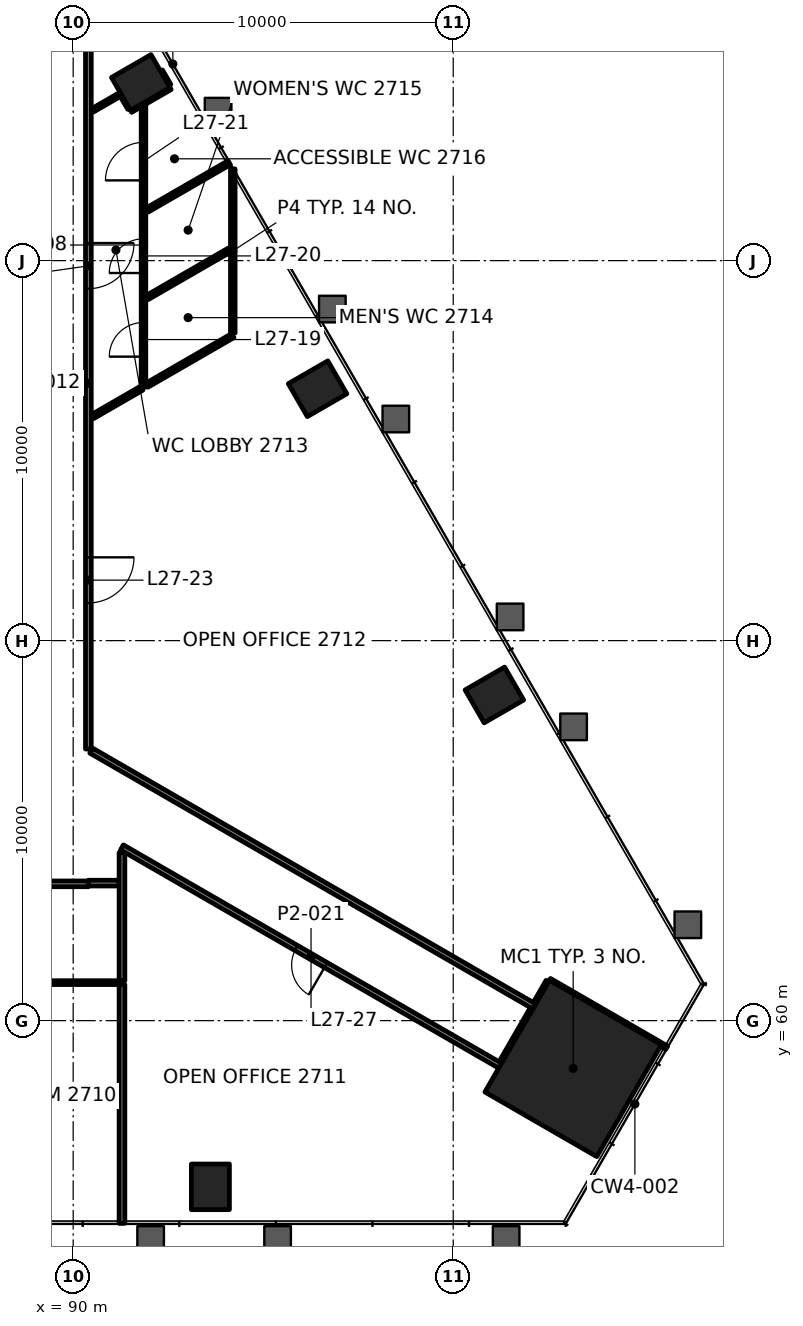
"""IFC4 building model, lengths in metres.
Left out: names, types, materials, properties, quantities, classifications, styles, units other than length and angle.
Written with IfcOpenShell. Run it as: python <this file> out.ifc"""

import sys

from ifc_helpers import new_model, si_unit, direction, frame, frame_2d, origin, origin_2d, place, context, subcontext, project, spatial, rectangle, extrude, element, fill, save


model = new_model("IFC4")
c1 = context("Model", 3, precision=1e-05, world=origin(), true_north=direction((0.0, 1.0)))
c2 = subcontext(c1, "Body", "Model", "MODEL_VIEW")
j1 = project(units=[si_unit("LENGTHUNIT", "METRE"), si_unit("PLANEANGLEUNIT", "RADIAN")], contexts=[c1])
p1 = place(None, origin())
s1 = spatial("IfcSite", under=j1, at=p1, CompositionType="ELEMENT")
p2 = place(p1, origin())
s2 = spatial("IfcBuilding", under=s1, at=p2, CompositionType="ELEMENT")
p3 = place(p2, frame((0.0, 0.0, 119.8)))
s3 = spatial("IfcBuildingStorey", under=s2, at=p3, CompositionType="ELEMENT", Elevation=119.8)
p4 = place(p3, frame((103.156, 58.744, 0.0), z_axis=(0.0, 0.0, 1.0), x_axis=(0.5, 0.866025403784, 0.0)))
e1 = element("IfcColumn", 1, at=p4, inside=s3, PredefinedType="COLUMN", context=c2, shape_type="SweptSolid", body=[
    extrude(rectangle(XDim=3.4, YDim=3.4, at=origin_2d()), origin(), (0.0, 0.0, 1.0), 4.2),
])
for number, where, z_axis, x_axis in (
    (2, (93.61, 55.626, -0.0), (0.0, 0.0, 1.0), (1.0, 0.0, 0.0)),
    (3, (101.083, 68.57, -0.0), (0.0, 0.0, 1.0), (-0.5, 0.866, 0.0)),
    (4, (96.431, 76.628, -0.0), (0.0, 0.0, 1.0), (-0.5, 0.866, 0.0)),
    (5, (91.778, 84.687, -0.0), (0.0, 0.0, 1.0), (-0.5, 0.866, 0.0)),
):
    element("IfcColumn", number, at=place(p3, frame(where, z_axis=z_axis, x_axis=x_axis)), inside=s3, PredefinedType="COLUMN", context=c2, shape_type="SweptSolid", body=[
        extrude(rectangle(XDim=1.0, YDim=1.2, at=origin_2d()), origin(), (0.0, 0.0, 1.0), 4.2),
    ])
p5 = place(p3, frame((57.751, 61.0, 0.0), z_axis=(0.0, 0.0, 1.0), x_axis=(1.0, 0.0, 0.0)))
e6 = element("IfcWall", 6, at=p5, inside=s3, PredefinedType="PARTITIONING", context=c2, shape_type="SweptSolid", body=[
    extrude(rectangle(XDim=33.533, YDim=0.1, at=frame_2d((16.766, 0.0))), origin(), (0.0, 0.0, 1.0), 3.4),
])
p6 = place(p5, frame((3.572, 0.0, 0.0)))
e7 = element("IfcOpeningElement", 7, at=p6, cuts=e6, PredefinedType="OPENING", context=c2, shape_type="SweptSolid", body=[
    extrude(rectangle(XDim=1.0, YDim=2.1, at=frame_2d((0.5, 1.05))), frame((0.0, 0.06, 0.0), z_axis=(0.0, -1.0, 0.0), x_axis=(1.0, 0.0, 0.0)), (0.0, 0.0, 1.0), 0.12),
])
p7 = place(p5, frame((9.822, 0.0, 0.0)))
e8 = element("IfcOpeningElement", 8, at=p7, cuts=e6, PredefinedType="OPENING", context=c2, shape_type="SweptSolid", body=[
    extrude(rectangle(XDim=0.9, YDim=2.1, at=frame_2d((0.45, 1.05))), frame((0.0, 0.06, 0.0), z_axis=(0.0, -1.0, 0.0), x_axis=(1.0, 0.0, 0.0)), (0.0, 0.0, 1.0), 0.12),
])
p8 = place(p5, frame((14.472, 0.0, 0.0)))
e9 = element("IfcOpeningElement", 9, at=p8, cuts=e6, PredefinedType="OPENING", context=c2, shape_type="SweptSolid", body=[
    extrude(rectangle(XDim=0.9, YDim=2.1, at=frame_2d((0.45, 1.05))), frame((0.0, 0.06, 0.0), z_axis=(0.0, -1.0, 0.0), x_axis=(1.0, 0.0, 0.0)), (0.0, 0.0, 1.0), 0.12),
])
p9 = place(p5, frame((19.124, 0.0, 0.0)))
e10 = element("IfcOpeningElement", 10, at=p9, cuts=e6, PredefinedType="OPENING", context=c2, shape_type="SweptSolid", body=[
    extrude(rectangle(XDim=0.9, YDim=2.1, at=frame_2d((0.45, 1.05))), frame((0.0, 0.06, 0.0), z_axis=(0.0, -1.0, 0.0), x_axis=(1.0, 0.0, 0.0)), (0.0, 0.0, 1.0), 0.12),
])
p10 = place(p5, frame((24.361, 0.0, 0.0)))
e11 = element("IfcOpeningElement", 11, at=p10, cuts=e6, PredefinedType="OPENING", context=c2, shape_type="SweptSolid", body=[
    extrude(rectangle(XDim=0.9, YDim=2.1, at=frame_2d((0.45, 1.05))), frame((0.0, 0.06, 0.0), z_axis=(0.0, -1.0, 0.0), x_axis=(1.0, 0.0, 0.0)), (0.0, 0.0, 1.0), 0.12),
])
p11 = place(p5, frame((30.073, 0.0, 0.0)))
e12 = element("IfcOpeningElement", 12, at=p11, cuts=e6, PredefinedType="OPENING", context=c2, shape_type="SweptSolid", body=[
    extrude(rectangle(XDim=0.9, YDim=2.1, at=frame_2d((0.45, 1.05))), frame((0.0, 0.06, 0.0), z_axis=(0.0, -1.0, 0.0), x_axis=(1.0, 0.0, 0.0)), (0.0, 0.0, 1.0), 0.12),
])
p12 = place(p3, frame((90.399, 63.6, 0.0), z_axis=(0.0, 0.0, 1.0), x_axis=(-1.0, 0.0, 0.0)))
e13 = element("IfcWall", 13, at=p12, inside=s3, PredefinedType="PARTITIONING", context=c2, shape_type="SweptSolid", body=[
    extrude(rectangle(XDim=30.799, YDim=0.15, at=frame_2d((15.4, 0.0))), origin(), (0.0, 0.0, 1.0), 3.4),
])
p13 = place(p12, frame((4.975, 0.0, 0.0)))
e14 = element("IfcOpeningElement", 14, at=p13, cuts=e13, PredefinedType="OPENING", context=c2, shape_type="SweptSolid", body=[
    extrude(rectangle(XDim=1.0, YDim=2.1, at=frame_2d((0.5, 1.05))), frame((0.0, 0.085, 0.0), z_axis=(0.0, -1.0, 0.0), x_axis=(1.0, 0.0, 0.0)), (0.0, 0.0, 1.0), 0.17),
])
p14 = place(p12, frame((17.226, 0.0, 0.0)))
e15 = element("IfcOpeningElement", 15, at=p14, cuts=e13, PredefinedType="OPENING", context=c2, shape_type="SweptSolid", body=[
    extrude(rectangle(XDim=1.0, YDim=2.1, at=frame_2d((0.5, 1.05))), frame((0.0, 0.085, 0.0), z_axis=(0.0, -1.0, 0.0), x_axis=(1.0, 0.0, 0.0)), (0.0, 0.0, 1.0), 0.17),
])
p15 = place(p12, frame((27.151, 0.0, 0.0)))
e16 = element("IfcOpeningElement", 16, at=p15, cuts=e13, PredefinedType="OPENING", context=c2, shape_type="SweptSolid", body=[
    extrude(rectangle(XDim=1.0, YDim=2.1, at=frame_2d((0.5, 1.05))), frame((0.0, 0.085, 0.0), z_axis=(0.0, -1.0, 0.0), x_axis=(1.0, 0.0, 0.0)), (0.0, 0.0, 1.0), 0.17),
])
p16 = place(p3, frame((90.4, 63.619, 0.0), z_axis=(0.0, 0.0, 1.0), x_axis=(1.0, 0.0, 0.0)))
e17 = element("IfcWall", 17, at=p16, inside=s3, PredefinedType="PARTITIONING", context=c2, shape_type="SweptSolid", body=[
    extrude(rectangle(XDim=0.809, YDim=0.15, at=frame_2d((0.404, 0.0))), origin(), (0.0, 0.0, 1.0), 3.4),
])
p17 = place(p3, frame((90.51, 75.896, 0.0), z_axis=(0.0, 0.0, 1.0), x_axis=(0.866055123991, 0.49994851956, 0.0)))
e18 = element("IfcWall", 18, at=p17, inside=s3, PredefinedType="PARTITIONING", context=c2, shape_type="SweptSolid", body=[
    extrude(rectangle(XDim=1.496, YDim=0.12, at=frame_2d((0.748, 0.0))), origin(), (0.0, 0.0, 1.0), 3.4),
])
p18 = place(p3, frame((91.945, 79.027, 0.0), z_axis=(0.0, 0.0, 1.0), x_axis=(0.86603079437, 0.499990663115, 0.0)))
e19 = element("IfcWall", 19, at=p18, inside=s3, PredefinedType="PARTITIONING", context=c2, shape_type="SweptSolid", body=[
    extrude(rectangle(XDim=2.495, YDim=0.12, at=frame_2d((1.248, 0.0))), origin(), (0.0, 0.0, 1.0), 3.4),
])
p19 = place(p3, frame((91.945, 81.329, 0.0), z_axis=(0.0, 0.0, 1.0), x_axis=(0.866024239756, 0.50000201615, 0.0)))
e20 = element("IfcWall", 20, at=p19, inside=s3, PredefinedType="PARTITIONING", context=c2, shape_type="SweptSolid", body=[
    extrude(rectangle(XDim=2.495, YDim=0.12, at=frame_2d((1.247, 0.0))), origin(), (0.0, 0.0, 1.0), 3.165),
])
p20 = place(p3, frame((91.509, 83.954, 0.0), z_axis=(0.0, 0.0, 1.0), x_axis=(0.865905532852, 0.500207565094, 0.0)))
e21 = element("IfcWall", 21, at=p20, inside=s3, PredefinedType="PARTITIONING", context=c2, shape_type="SweptSolid", body=[
    extrude(rectangle(XDim=0.291, YDim=0.12, at=frame_2d((0.145, 0.0))), origin(), (0.0, 0.0, 1.0), 3.4),
])
p21 = place(p3, frame((90.501, 83.95, 0.0), z_axis=(0.0, 0.0, 1.0), x_axis=(0.866069322143, 0.499923923456, 0.0)))
e22 = element("IfcWall", 22, at=p21, inside=s3, PredefinedType="PARTITIONING", context=c2, shape_type="SweptSolid", body=[
    extrude(rectangle(XDim=0.874, YDim=0.1, at=frame_2d((0.437, 0.0))), origin(), (0.0, 0.0, 1.0), 3.4),
])
p22 = place(p3, frame((101.272, 58.88, 0.0), z_axis=(0.0, 0.0, 1.0), x_axis=(0.500038426333, 0.866003217194, 0.0)))
e23 = element("IfcWall", 23, at=p22, inside=s3, PredefinedType="PARTITIONING", context=c2, shape_type="SweptSolid", body=[
    extrude(rectangle(XDim=1.65, YDim=0.15, at=frame_2d((0.825, 0.0))), origin(), (0.0, 0.0, 1.0), 3.247),
])
p23 = place(p3, frame((94.2, 78.096, 0.0), z_axis=(0.0, 0.0, 1.0), x_axis=(0.0, 1.0, 0.0)))
e24 = element("IfcWall", 24, at=p23, inside=s3, PredefinedType="PARTITIONING", context=c2, shape_type="SweptSolid", body=[
    extrude(rectangle(XDim=4.316, YDim=0.12, at=frame_2d((2.158, 0.0))), origin(), (0.0, 0.0, 1.0), 3.165),
])
p24 = place(p3, frame((91.85, 76.67, 0.0), z_axis=(0.0, 0.0, 1.0), x_axis=(0.0, 1.0, 0.0)))
e25 = element("IfcWall", 25, at=p24, inside=s3, PredefinedType="PARTITIONING", context=c2, shape_type="SweptSolid", body=[
    extrude(rectangle(XDim=7.481, YDim=0.12, at=frame_2d((3.741, 0.0))), origin(), (0.0, 0.0, 1.0), 3.4),
])
p25 = place(p24, frame((0.803, 0.0, 0.0)))
e26 = element("IfcOpeningElement", 26, at=p25, cuts=e25, PredefinedType="OPENING", context=c2, shape_type="SweptSolid", body=[
    extrude(rectangle(XDim=0.9, YDim=2.1, at=frame_2d((0.45, 1.05))), frame((0.0, 0.07, 0.0), z_axis=(0.0, -1.0, 0.0), x_axis=(1.0, 0.0, 0.0)), (0.0, 0.0, 1.0), 0.14),
])
p26 = place(p24, frame((3.004, 0.0, 0.0)))
e27 = element("IfcOpeningElement", 27, at=p26, cuts=e25, PredefinedType="OPENING", context=c2, shape_type="SweptSolid", body=[
    extrude(rectangle(XDim=0.9, YDim=2.1, at=frame_2d((0.45, 1.05))), frame((0.0, 0.07, 0.0), z_axis=(0.0, -1.0, 0.0), x_axis=(1.0, 0.0, 0.0)), (0.0, 0.0, 1.0), 0.14),
])
p27 = place(p24, frame((5.441, 0.0, 0.0)))
e28 = element("IfcOpeningElement", 28, at=p27, cuts=e25, PredefinedType="OPENING", context=c2, shape_type="SweptSolid", body=[
    extrude(rectangle(XDim=1.0, YDim=2.1, at=frame_2d((0.5, 1.05))), frame((0.0, 0.07, 0.0), z_axis=(0.0, -1.0, 0.0), x_axis=(1.0, 0.0, 0.0)), (0.0, 0.0, 1.0), 0.14),
])
p28 = place(p3, frame((91.284, 54.666, 0.0), z_axis=(0.0, 0.0, 1.0), x_axis=(0.0, 1.0, 0.0)))
e29 = element("IfcWall", 29, at=p28, inside=s3, PredefinedType="PARTITIONING", context=c2, shape_type="SweptSolid", body=[
    extrude(rectangle(XDim=6.284, YDim=0.15, at=frame_2d((3.142, 0.0))), origin(), (0.0, 0.0, 1.0), 3.165),
])
p29 = place(p3, frame((90.4, 86.399, 0.0), z_axis=(0.0, 0.0, 1.0), x_axis=(0.0, -1.0, 0.0)))
e30 = element("IfcWall", 30, at=p29, inside=s3, PredefinedType="PARTITIONING", context=c2, shape_type="SweptSolid", body=[
    extrude(rectangle(XDim=19.251, YDim=0.15, at=frame_2d((9.626, 0.0))), origin(), (0.0, 0.0, 1.0), 3.4),
])
p30 = place(p29, frame((5.937, 0.0, 0.0)))
e31 = element("IfcOpeningElement", 31, at=p30, cuts=e30, PredefinedType="OPENING", context=c2, shape_type="SweptSolid", body=[
    extrude(rectangle(XDim=1.2, YDim=2.1, at=frame_2d((0.6, 1.05))), frame((0.0, 0.085, 0.0), z_axis=(0.0, -1.0, 0.0), x_axis=(1.0, 0.0, 0.0)), (0.0, 0.0, 1.0), 0.17),
])
p31 = place(p29, frame((14.207, 0.0, 0.0)))
e32 = element("IfcOpeningElement", 32, at=p31, cuts=e30, PredefinedType="OPENING", context=c2, shape_type="SweptSolid", body=[
    extrude(rectangle(XDim=1.2, YDim=2.1, at=frame_2d((0.6, 1.05))), frame((0.0, 0.085, 0.0), z_axis=(0.0, -1.0, 0.0), x_axis=(1.0, 0.0, 0.0)), (0.0, 0.0, 1.0), 0.17),
])
p32 = place(p3, frame((92.518, 84.606, 0.0), z_axis=(0.0, 0.0, 1.0), x_axis=(-0.499962889934, 0.866046828231, 0.0)))
e33 = element("IfcWall", 33, at=p32, inside=s3, PredefinedType="PARTITIONING", context=c2, shape_type="SweptSolid", body=[
    extrude(rectangle(XDim=0.439, YDim=0.12, at=frame_2d((0.22, 0.0))), origin(), (0.0, 0.0, 1.0), 3.4),
])
p33 = place(p3, frame((91.479, 84.006, 0.0), z_axis=(0.0, 0.0, 1.0), x_axis=(-0.499649997908, 0.866227383307, 0.0)))
e34 = element("IfcWall", 34, at=p33, inside=s3, PredefinedType="PARTITIONING", context=c2, shape_type="SweptSolid", body=[
    extrude(rectangle(XDim=0.389, YDim=0.1, at=frame_2d((0.194, 0.0))), origin(), (0.0, 0.0, 1.0), 3.4),
])
p34 = place(p3, frame((105.617, 59.286, 0.0), z_axis=(0.0, 0.0, 1.0), x_axis=(-0.866043951586, 0.49996787289, 0.0)))
e35 = element("IfcWall", 35, at=p34, inside=s3, PredefinedType="PARTITIONING", context=c2, shape_type="SweptSolid", body=[
    extrude(rectangle(XDim=3.559, YDim=0.1, at=frame_2d((1.78, 0.0))), origin(), (0.0, 0.0, 1.0), 3.4),
])
p35 = place(p3, frame((102.134, 60.374, 0.0), z_axis=(0.0, 0.0, 1.0), x_axis=(-0.86602824724, 0.499995074959, 0.0)))
e36 = element("IfcWall", 36, at=p35, inside=s3, PredefinedType="PARTITIONING", context=c2, shape_type="SweptSolid", body=[
    extrude(rectangle(XDim=13.463, YDim=0.15, at=frame_2d((6.731, 0.0))), origin(), (0.0, 0.0, 1.0), 3.4),
])
p36 = place(p3, frame((101.234, 58.815, 0.0), z_axis=(0.0, 0.0, 1.0), x_axis=(-0.866028466704, 0.49999469483, 0.0)))
e37 = element("IfcWall", 37, at=p36, inside=s3, PredefinedType="PARTITIONING", context=c2, shape_type="SweptSolid", body=[
    extrude(rectangle(XDim=11.489, YDim=0.15, at=frame_2d((5.744, 0.0))), origin(), (0.0, 0.0, 1.0), 3.247),
])
p37 = place(p36, frame((5.294, 0.0, 0.0)))
e38 = element("IfcOpeningElement", 38, at=p37, cuts=e37, PredefinedType="OPENING", context=c2, shape_type="SweptSolid", body=[
    extrude(rectangle(XDim=0.9, YDim=2.1, at=frame_2d((0.45, 1.05))), frame((0.0, 0.085, 0.0), z_axis=(0.0, -1.0, 0.0), x_axis=(1.0, 0.0, 0.0)), (0.0, 0.0, 1.0), 0.17),
])
p38 = place(p3, frame((91.284, 61.05, 0.0), z_axis=(0.0, 0.0, 1.0), x_axis=(0.0, 1.0, 0.0)))
e39 = element("IfcWall", 39, at=p38, inside=s3, PredefinedType="PARTITIONING", context=c2, shape_type="SweptSolid", body=[
    extrude(rectangle(XDim=3.373, YDim=0.15, at=frame_2d((1.686, 0.0))), origin(), (0.0, 0.0, 1.0), 3.247),
])
p39 = place(p3, frame((91.94, 76.722, 0.0), z_axis=(0.0, 0.0, 1.0), x_axis=(0.866006422342, 0.500032875382, 0.0)))
e40 = element("IfcWall", 40, at=p39, inside=s3, PredefinedType="PARTITIONING", context=c2, shape_type="SweptSolid", body=[
    extrude(rectangle(XDim=2.61, YDim=0.12, at=frame_2d((1.305, 0.0))), origin(), (0.0, 0.0, 1.0), 3.4),
])
p40 = place(p3, frame((91.895, 84.177, 0.0), z_axis=(0.0, 0.0, 1.0), x_axis=(0.865980481111, 0.500077800282, 0.0)))
e41 = element("IfcWall", 41, at=p40, inside=s3, PredefinedType="PARTITIONING", context=c2, shape_type="SweptSolid", body=[
    extrude(rectangle(XDim=0.753, YDim=0.12, at=frame_2d((0.377, 0.0))), origin(), (0.0, 0.0, 1.0), 3.165),
])
p41 = place(p3, frame((102.172, 60.438, 0.0), z_axis=(0.0, 0.0, 1.0), x_axis=(0.499994068514, 0.866028828302, 0.0)))
e42 = element("IfcWall", 42, at=p41, inside=s3, PredefinedType="PARTITIONING", context=c2, shape_type="SweptSolid", body=[
    extrude(rectangle(XDim=0.674, YDim=0.15, at=frame_2d((0.337, 0.0))), origin(), (0.0, 0.0, 1.0), 3.4),
])
p42 = place(p25, origin())
e43 = element("IfcDoor", 43, at=p42, inside=s3, OperationType="SINGLE_SWING_LEFT", PredefinedType="DOOR", context=c2, shape_type="SweptSolid", body=[
    extrude(rectangle(XDim=0.9, YDim=2.1, at=frame_2d((0.45, 1.05))), frame((0.0, 0.025, 0.0), z_axis=(0.0, -1.0, 0.0), x_axis=(1.0, 0.0, 0.0)), (0.0, 0.0, 1.0), 0.05),
])
fill(e26, e43)
p43 = place(p26, origin())
e44 = element("IfcDoor", 44, at=p43, inside=s3, OperationType="SINGLE_SWING_RIGHT", PredefinedType="DOOR", context=c2, shape_type="SweptSolid", body=[
    extrude(rectangle(XDim=0.9, YDim=2.1, at=frame_2d((0.45, 1.05))), frame((0.0, 0.025, 0.0), z_axis=(0.0, -1.0, 0.0), x_axis=(1.0, 0.0, 0.0)), (0.0, 0.0, 1.0), 0.05),
])
fill(e27, e44)
p44 = place(p27, origin())
e45 = element("IfcDoor", 45, at=p44, inside=s3, OperationType="SINGLE_SWING_LEFT", PredefinedType="DOOR", context=c2, shape_type="SweptSolid", body=[
    extrude(rectangle(XDim=1.0, YDim=2.1, at=frame_2d((0.5, 1.05))), frame((0.0, 0.025, 0.0), z_axis=(0.0, -1.0, 0.0), x_axis=(1.0, 0.0, 0.0)), (0.0, 0.0, 1.0), 0.05),
])
fill(e28, e45)
p45 = place(p30, origin())
e46 = element("IfcDoor", 46, at=p45, inside=s3, OperationType="DOUBLE_DOOR_SINGLE_SWING", PredefinedType="DOOR", context=c2, shape_type="SweptSolid", body=[
    extrude(rectangle(XDim=1.2, YDim=2.1, at=frame_2d((0.6, 1.05))), frame((0.0, 0.025, 0.0), z_axis=(0.0, -1.0, 0.0), x_axis=(1.0, 0.0, 0.0)), (0.0, 0.0, 1.0), 0.05),
])
fill(e31, e46)
p46 = place(p31, origin())
e47 = element("IfcDoor", 47, at=p46, inside=s3, OperationType="DOUBLE_DOOR_SINGLE_SWING", PredefinedType="DOOR", context=c2, shape_type="SweptSolid", body=[
    extrude(rectangle(XDim=1.2, YDim=2.1, at=frame_2d((0.6, 1.05))), frame((0.0, 0.025, 0.0), z_axis=(0.0, -1.0, 0.0), x_axis=(1.0, 0.0, 0.0)), (0.0, 0.0, 1.0), 0.05),
])
fill(e32, e47)
p47 = place(p37, origin())
e48 = element("IfcDoor", 48, at=p47, inside=s3, OperationType="SINGLE_SWING_RIGHT", PredefinedType="DOOR", context=c2, shape_type="SweptSolid", body=[
    extrude(rectangle(XDim=0.9, YDim=2.1, at=frame_2d((0.45, 1.05))), frame((0.0, 0.025, 0.0), z_axis=(0.0, -1.0, 0.0), x_axis=(1.0, 0.0, 0.0)), (0.0, 0.0, 1.0), 0.05),
])
fill(e38, e48)
save(model, sys.argv[1])
